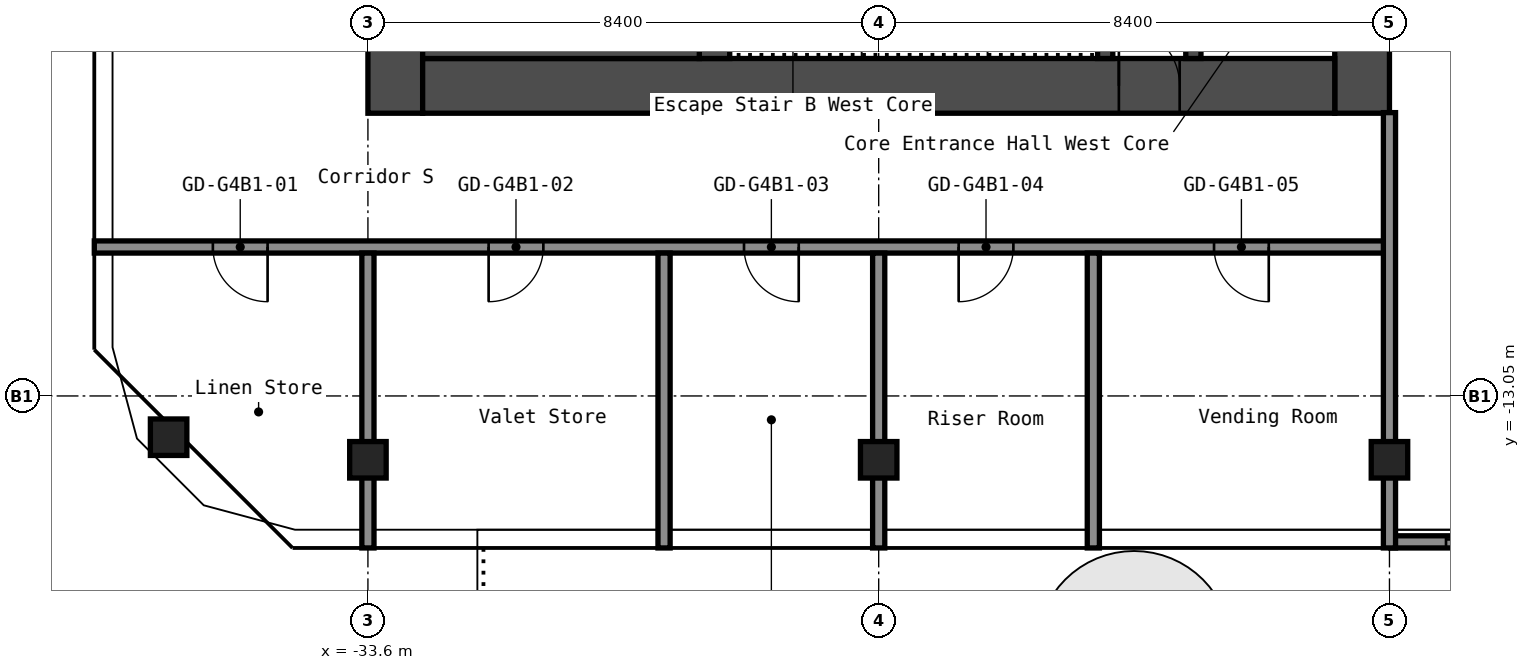
"""IFC4 building model, lengths in metres.
Left out: names, types, materials, properties, quantities, classifications, styles, units other than length and angle.
Written with IfcOpenShell. Run it as: python <this file> out.ifc"""

import sys

from ifc_helpers import new_model, si_unit, direction, frame, frame_2d, origin, origin_2d, place, context, subcontext, project, spatial, rectangle, hollow_rectangle, extrude, element, fill, save


model = new_model("IFC4")
c1 = context("Model", 3, precision=1e-05, world=origin(), true_north=direction((0.0, 1.0)))
c2 = subcontext(c1, "Body", "Model", "MODEL_VIEW")
j1 = project(units=[si_unit("LENGTHUNIT", "METRE"), si_unit("PLANEANGLEUNIT", "RADIAN")], contexts=[c1])
p1 = place(None, origin())
s1 = spatial("IfcSite", under=j1, at=p1, CompositionType="ELEMENT")
p2 = place(p1, origin())
s2 = spatial("IfcBuilding", under=s1, at=p2, CompositionType="ELEMENT")
p3 = place(p2, frame((0.0, 0.0, 205.8)))
s3 = spatial("IfcBuildingStorey", under=s2, at=p3, CompositionType="ELEMENT", Elevation=205.8)
for number, where, z_axis, x_axis in (
    (1, (-36.878, -13.729, 0.0), (0.0, 0.0, 1.0), (1.0, 0.0, 0.0)),
    (2, (-33.6, -14.1, 0.0), (0.0, 0.0, 1.0), (1.0, 0.0, 0.0)),
    (3, (-25.2, -14.1, 0.0), (0.0, 0.0, 1.0), (1.0, 0.0, 0.0)),
    (4, (-16.8, -14.1, 0.0), (0.0, 0.0, 1.0), (1.0, 0.0, 0.0)),
):
    element("IfcColumn", number, at=place(p3, frame(where, z_axis=z_axis, x_axis=x_axis)), inside=s3, PredefinedType="COLUMN", context=c2, shape_type="SweptSolid", body=[
        extrude(hollow_rectangle(XDim=0.6, YDim=0.6, WallThickness=0.025, InnerFilletRadius=0.038, OuterFilletRadius=0.062, at=origin_2d()), origin(), (0.0, 0.0, 1.0), 2.75),
    ])
p4 = place(p3, frame((-17.25, -8.4, 0.0), z_axis=(0.0, 0.0, 1.0), x_axis=(0.0, 1.0, 0.0)))
e5 = element("IfcWall", 5, at=p4, inside=s3, PredefinedType="SHEAR", context=c2, shape_type="SweptSolid", body=[
    extrude(rectangle(XDim=16.8, YDim=0.9, at=frame_2d((8.4, 0.0))), origin(), (0.0, 0.0, 1.0), 2.75),
])
p5 = place(p4, frame((10.1, 0.0, 0.0)))
e6 = element("IfcOpeningElement", 6, at=p5, cuts=e5, PredefinedType="OPENING", context=c2, shape_type="SweptSolid", body=[
    extrude(rectangle(XDim=1.6, YDim=2.1, at=frame_2d((0.8, 1.05))), frame((0.0, 0.46, 0.0), z_axis=(0.0, -1.0, 0.0), x_axis=(1.0, 0.0, 0.0)), (0.0, 0.0, 1.0), 0.92),
])
p6 = place(p3, frame((-33.15, -8.4, 0.0), z_axis=(0.0, 0.0, 1.0), x_axis=(0.0, 1.0, 0.0)))
e7 = element("IfcWall", 7, at=p6, inside=s3, PredefinedType="SHEAR", context=c2, shape_type="SweptSolid", body=[
    extrude(rectangle(XDim=16.8, YDim=0.9, at=frame_2d((8.4, 0.0))), origin(), (0.0, 0.0, 1.0), 2.75),
])
p7 = place(p3, frame((-32.7, -7.95, 0.0), z_axis=(0.0, 0.0, 1.0), x_axis=(1.0, 0.0, 0.0)))
e8 = element("IfcWall", 8, at=p7, inside=s3, PredefinedType="SHEAR", context=c2, shape_type="SweptSolid", body=[
    extrude(rectangle(XDim=15.0, YDim=0.9, at=frame_2d((7.5, 0.0))), origin(), (0.0, 0.0, 1.0), 2.75),
])
p8 = place(p7, frame((11.45, 0.0, 0.0)))
e9 = element("IfcOpeningElement", 9, at=p8, cuts=e8, PredefinedType="OPENING", context=c2, shape_type="SweptSolid", body=[
    extrude(rectangle(XDim=1.0, YDim=2.1, at=frame_2d((0.5, 1.05))), frame((0.0, 0.46, 0.0), z_axis=(0.0, -1.0, 0.0), x_axis=(1.0, 0.0, 0.0)), (0.0, 0.0, 1.0), 0.92),
])
p9 = place(p3, frame((-20.025, -7.5, 0.0), z_axis=(0.0, 0.0, 1.0), x_axis=(0.0, 1.0, 0.0)))
e10 = element("IfcWall", 10, at=p9, inside=s3, PredefinedType="SHEAR", context=c2, shape_type="SweptSolid", body=[
    extrude(rectangle(XDim=6.3, YDim=0.25, at=frame_2d((3.15, 0.0))), origin(), (0.0, 0.0, 1.0), 2.75),
])
p10 = place(p9, frame((2.4, 0.0, 0.0)))
e11 = element("IfcOpeningElement", 11, at=p10, cuts=e10, PredefinedType="OPENING", context=c2, shape_type="SweptSolid", body=[
    extrude(rectangle(XDim=1.0, YDim=2.1, at=frame_2d((0.5, 1.05))), frame((0.0, 0.135, 0.0), z_axis=(0.0, -1.0, 0.0), x_axis=(1.0, 0.0, 0.0)), (0.0, 0.0, 1.0), 0.27),
])
p11 = place(p3, frame((-21.475, -7.5, 0.0), z_axis=(0.0, 0.0, 1.0), x_axis=(0.0, 1.0, 0.0)))
e12 = element("IfcWall", 12, at=p11, inside=s3, PredefinedType="SHEAR", context=c2, shape_type="SweptSolid", body=[
    extrude(rectangle(XDim=3.75, YDim=0.25, at=frame_2d((1.875, 0.0))), origin(), (0.0, 0.0, 1.0), 2.75),
])
p12 = place(p11, frame((1.3, 0.0, 0.0)))
e13 = element("IfcOpeningElement", 13, at=p12, cuts=e12, PredefinedType="OPENING", context=c2, shape_type="SweptSolid", body=[
    extrude(rectangle(XDim=1.2, YDim=2.1, at=frame_2d((0.6, 1.05))), frame((0.0, 0.135, 0.0), z_axis=(0.0, -1.0, 0.0), x_axis=(1.0, 0.0, 0.0)), (0.0, 0.0, 1.0), 0.27),
])
p13 = place(p3, frame((-27.9, -7.5, 0.0), z_axis=(0.0, 0.0, 1.0), x_axis=(0.0, 1.0, 0.0)))
e14 = element("IfcWall", 14, at=p13, inside=s3, PredefinedType="SHEAR", context=c2, shape_type="SweptSolid", body=[
    extrude(rectangle(XDim=3.75, YDim=0.5, at=frame_2d((1.875, 0.0))), origin(), (0.0, 0.0, 1.0), 2.75),
])
p14 = place(p3, frame((-32.7, -6.75, 0.0), z_axis=(0.0, 0.0, 1.0), x_axis=(1.0, 0.0, 0.0)))
e15 = element("IfcWall", 15, at=p14, inside=s3, PredefinedType="SHEAR", context=c2, shape_type="SweptSolid", body=[
    extrude(rectangle(XDim=4.55, YDim=1.5, at=frame_2d((2.275, 0.0))), origin(), (0.0, 0.0, 1.0), 2.75),
])
p15 = place(p3, frame((-38.1, -10.6, 0.0), z_axis=(0.0, 0.0, 1.0), x_axis=(1.0, 0.0, 0.0)))
e16 = element("IfcWall", 16, at=p15, inside=s3, PredefinedType="PARTITIONING", context=c2, shape_type="SweptSolid", body=[
    extrude(rectangle(XDim=21.3, YDim=0.2, at=frame_2d((10.65, 0.0))), origin(), (0.0, 0.0, 1.0), 2.75),
])
p16 = place(p15, frame((1.95, 0.0, 0.0)))
e17 = element("IfcOpeningElement", 17, at=p16, cuts=e16, PredefinedType="OPENING", context=c2, shape_type="SweptSolid", body=[
    extrude(rectangle(XDim=0.9, YDim=2.1, at=frame_2d((0.45, 1.05))), frame((0.0, 0.11, 0.0), z_axis=(0.0, -1.0, 0.0), x_axis=(1.0, 0.0, 0.0)), (0.0, 0.0, 1.0), 0.22),
])
p17 = place(p15, frame((6.485, 0.0, 0.0)))
e18 = element("IfcOpeningElement", 18, at=p17, cuts=e16, PredefinedType="OPENING", context=c2, shape_type="SweptSolid", body=[
    extrude(rectangle(XDim=0.9, YDim=2.1, at=frame_2d((0.45, 1.05))), frame((0.0, 0.11, 0.0), z_axis=(0.0, -1.0, 0.0), x_axis=(1.0, 0.0, 0.0)), (0.0, 0.0, 1.0), 0.22),
])
p18 = place(p15, frame((10.685, 0.0, 0.0)))
e19 = element("IfcOpeningElement", 19, at=p18, cuts=e16, PredefinedType="OPENING", context=c2, shape_type="SweptSolid", body=[
    extrude(rectangle(XDim=0.9, YDim=2.1, at=frame_2d((0.45, 1.05))), frame((0.0, 0.11, 0.0), z_axis=(0.0, -1.0, 0.0), x_axis=(1.0, 0.0, 0.0)), (0.0, 0.0, 1.0), 0.22),
])
p19 = place(p15, frame((14.215, 0.0, 0.0)))
e20 = element("IfcOpeningElement", 20, at=p19, cuts=e16, PredefinedType="OPENING", context=c2, shape_type="SweptSolid", body=[
    extrude(rectangle(XDim=0.9, YDim=2.1, at=frame_2d((0.45, 1.05))), frame((0.0, 0.11, 0.0), z_axis=(0.0, -1.0, 0.0), x_axis=(1.0, 0.0, 0.0)), (0.0, 0.0, 1.0), 0.22),
])
p20 = place(p15, frame((18.415, 0.0, 0.0)))
e21 = element("IfcOpeningElement", 21, at=p20, cuts=e16, PredefinedType="OPENING", context=c2, shape_type="SweptSolid", body=[
    extrude(rectangle(XDim=0.9, YDim=2.1, at=frame_2d((0.45, 1.05))), frame((0.0, 0.11, 0.0), z_axis=(0.0, -1.0, 0.0), x_axis=(1.0, 0.0, 0.0)), (0.0, 0.0, 1.0), 0.22),
])
for number, where, z_axis, x_axis in (
    (22, (-33.6, -15.55, 0.0), (0.0, 0.0, 1.0), (0.0, 1.0, 0.0)),
    (23, (-28.73, -15.55, 0.0), (0.0, 0.0, 1.0), (0.0, 1.0, 0.0)),
    (24, (-25.2, -15.55, 0.0), (0.0, 0.0, 1.0), (0.0, 1.0, 0.0)),
    (25, (-21.67, -15.55, 0.0), (0.0, 0.0, 1.0), (0.0, 1.0, 0.0)),
):
    element("IfcWall", number, at=place(p3, frame(where, z_axis=z_axis, x_axis=x_axis)), inside=s3, PredefinedType="PARTITIONING", context=c2, shape_type="SweptSolid", body=[
        extrude(rectangle(XDim=4.85, YDim=0.2, at=frame_2d((2.425, 0.0))), origin(), (0.0, 0.0, 1.0), 2.75),
    ])
p21 = place(p3, frame((-16.8, -15.55, 0.0), z_axis=(0.0, 0.0, 1.0), x_axis=(0.0, 1.0, 0.0)))
e26 = element("IfcWall", 26, at=p21, inside=s3, PredefinedType="PARTITIONING", context=c2, shape_type="SweptSolid", body=[
    extrude(rectangle(XDim=7.16, YDim=0.2, at=frame_2d((3.58, 0.0))), origin(), (0.0, 0.0, 1.0), 2.75),
])
p22 = place(p3, frame((-16.78, -15.45, 0.0), z_axis=(0.0, 0.0, 1.0), x_axis=(1.0, 0.0, 0.0)))
p23 = place(p22, frame((0.91, 0.0, 0.0)))
p24 = place(p23, frame((2.4, 0.0, 0.0), z_axis=(0.0, 0.0, 1.0), x_axis=(-1.0, 0.0, 0.0)))
e27 = element("IfcDoor", 27, at=p24, inside=s3, OperationType="SLIDING_TO_LEFT", PredefinedType="DOOR", context=c2, shape_type="SweptSolid", body=[
    extrude(rectangle(XDim=2.4, YDim=2.2, at=frame_2d((1.2, 1.1))), frame((0.0, 0.025, 0.0), z_axis=(0.0, -1.0, 0.0), x_axis=(1.0, 0.0, 0.0)), (0.0, 0.0, 1.0), 0.05),
])
p25 = place(p8, origin())
e28 = element("IfcDoor", 28, at=p25, inside=s3, OperationType="SINGLE_SWING_RIGHT", PredefinedType="DOOR", context=c2, shape_type="SweptSolid", body=[
    extrude(rectangle(XDim=1.0, YDim=2.1, at=frame_2d((0.5, 1.05))), frame((0.0, 0.025, 0.0), z_axis=(0.0, -1.0, 0.0), x_axis=(1.0, 0.0, 0.0)), (0.0, 0.0, 1.0), 0.05),
])
fill(e9, e28)
p26 = place(p16, origin())
e29 = element("IfcDoor", 29, at=p26, inside=s3, OperationType="SINGLE_SWING_RIGHT", PredefinedType="DOOR", context=c2, shape_type="SweptSolid", body=[
    extrude(rectangle(XDim=0.9, YDim=2.1, at=frame_2d((0.45, 1.05))), frame((0.0, 0.025, 0.0), z_axis=(0.0, -1.0, 0.0), x_axis=(1.0, 0.0, 0.0)), (0.0, 0.0, 1.0), 0.05),
])
fill(e17, e29)
p27 = place(p17, origin())
e30 = element("IfcDoor", 30, at=p27, inside=s3, OperationType="SINGLE_SWING_LEFT", PredefinedType="DOOR", context=c2, shape_type="SweptSolid", body=[
    extrude(rectangle(XDim=0.9, YDim=2.1, at=frame_2d((0.45, 1.05))), frame((0.0, 0.025, 0.0), z_axis=(0.0, -1.0, 0.0), x_axis=(1.0, 0.0, 0.0)), (0.0, 0.0, 1.0), 0.05),
])
fill(e18, e30)
p28 = place(p18, origin())
e31 = element("IfcDoor", 31, at=p28, inside=s3, OperationType="SINGLE_SWING_RIGHT", PredefinedType="DOOR", context=c2, shape_type="SweptSolid", body=[
    extrude(rectangle(XDim=0.9, YDim=2.1, at=frame_2d((0.45, 1.05))), frame((0.0, 0.025, 0.0), z_axis=(0.0, -1.0, 0.0), x_axis=(1.0, 0.0, 0.0)), (0.0, 0.0, 1.0), 0.05),
])
fill(e19, e31)
p29 = place(p19, origin())
e32 = element("IfcDoor", 32, at=p29, inside=s3, OperationType="SINGLE_SWING_LEFT", PredefinedType="DOOR", context=c2, shape_type="SweptSolid", body=[
    extrude(rectangle(XDim=0.9, YDim=2.1, at=frame_2d((0.45, 1.05))), frame((0.0, 0.025, 0.0), z_axis=(0.0, -1.0, 0.0), x_axis=(1.0, 0.0, 0.0)), (0.0, 0.0, 1.0), 0.05),
])
fill(e20, e32)
p30 = place(p20, origin())
e33 = element("IfcDoor", 33, at=p30, inside=s3, OperationType="SINGLE_SWING_RIGHT", PredefinedType="DOOR", context=c2, shape_type="SweptSolid", body=[
    extrude(rectangle(XDim=0.9, YDim=2.1, at=frame_2d((0.45, 1.05))), frame((0.0, 0.025, 0.0), z_axis=(0.0, -1.0, 0.0), x_axis=(1.0, 0.0, 0.0)), (0.0, 0.0, 1.0), 0.05),
])
fill(e21, e33)
save(model, sys.argv[1])
